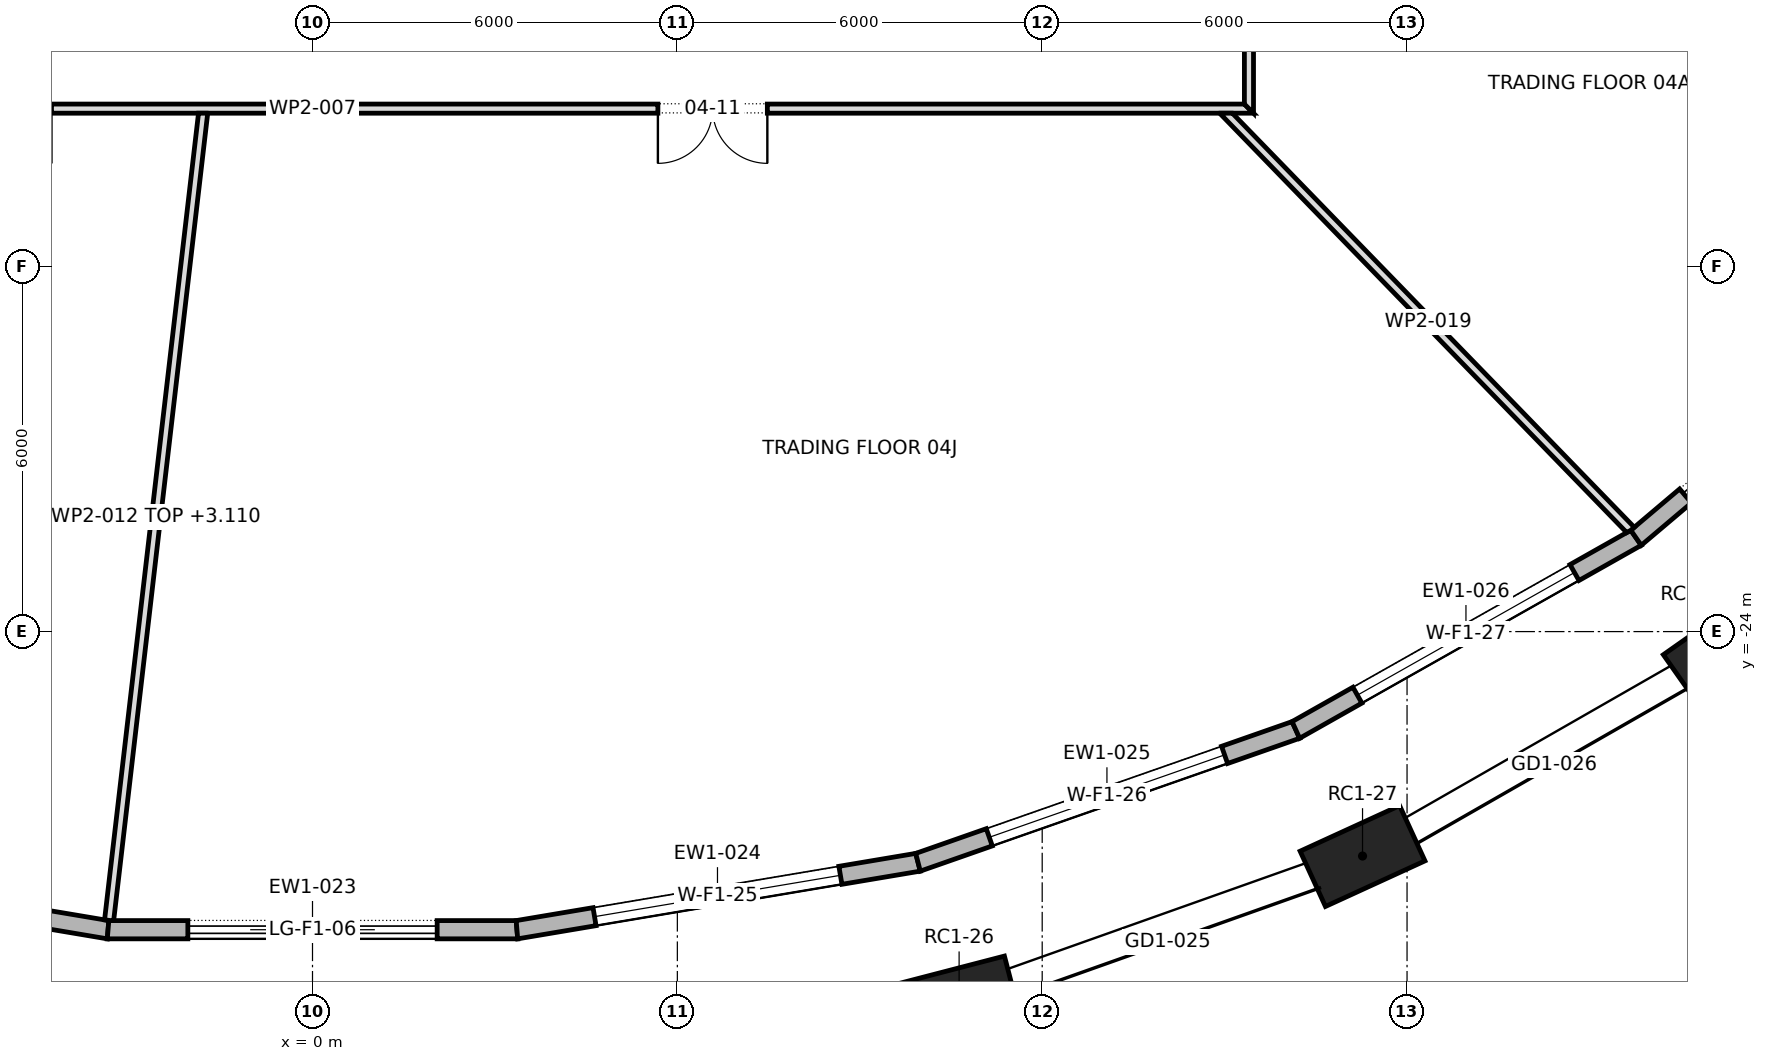
"""IFC4 building model, lengths in metres.
Left out: names, types, materials, properties, quantities, classifications, styles, units other than length and angle.
Written with IfcOpenShell. Run it as: python <this file> out.ifc"""

import sys

from ifc_helpers import new_model, si_unit, direction, frame, frame_2d, origin, origin_2d, place, context, subcontext, project, spatial, polyline, rectangle, outline, extrude, element, fill, save


model = new_model("IFC4")
c1 = context("Model", 3, precision=1e-05, world=origin(), true_north=direction((0.0, 1.0)))
c2 = subcontext(c1, "Body", "Model", "MODEL_VIEW")
j1 = project(units=[si_unit("LENGTHUNIT", "METRE"), si_unit("PLANEANGLEUNIT", "RADIAN")], contexts=[c1])
p1 = place(None, origin())
s1 = spatial("IfcSite", under=j1, at=p1, CompositionType="ELEMENT")
p2 = place(p1, origin())
s2 = spatial("IfcBuilding", under=s1, at=p2, CompositionType="ELEMENT")
p3 = place(p2, frame((0.0, 0.0, 69.7)))
s3 = spatial("IfcBuildingStorey", under=s2, at=p3, CompositionType="ELEMENT", Elevation=69.7)
for number, where, z_axis, x_axis in (
    (1, (10.634, -30.046, 0.0), (0.0, 0.0, 1.0), (0.968, 0.252, 0.0)),
    (2, (17.268, -27.691, 0.0), (0.0, 0.0, 1.0), (0.909, 0.417, 0.0)),
    (3, (23.239, -24.271, 0.0), (0.0, 0.0, 1.0), (0.818, 0.575, 0.0)),
):
    element("IfcColumn", number, at=place(p3, frame(where, z_axis=z_axis, x_axis=x_axis)), inside=s3, PredefinedType="COLUMN", context=c2, shape_type="SweptSolid", body=[
        extrude(rectangle(XDim=1.8, YDim=1.0, at=origin_2d()), origin(), (0.0, 0.0, 1.0), 4.2),
    ])
p4 = place(p3, frame((-9.958, -27.793, 0.0), z_axis=(0.0, 0.0, 1.0), x_axis=(0.986153133093, -0.165837263877, 0.0)))
e4 = element("IfcWall", 4, at=p4, inside=s3, PredefinedType="STANDARD", context=c2, shape_type="SweptSolid", body=[
    extrude(outline(polyline([(-0.013, -0.15), (6.7, -0.15), (6.676, 0.15), (0.013, 0.15), (-0.013, -0.15)])), origin(), (0.0, 0.0, 1.0), 3.9),
])
p5 = place(p4, frame((1.294, 0.0, 0.6)))
e5 = element("IfcOpeningElement", 5, at=p5, cuts=e4, PredefinedType="OPENING", context=c2, shape_type="SweptSolid", body=[
    extrude(rectangle(XDim=4.1, YDim=2.85, at=frame_2d((2.05, 1.425))), frame((0.0, 0.162, 0.0), z_axis=(0.0, -1.0, 0.0), x_axis=(1.0, 0.0, 0.0)), (0.0, 0.0, 1.0), 0.324),
])
p6 = place(p3, frame((-3.362, -28.903, 0.0), z_axis=(0.0, 0.0, 1.0), x_axis=(1.0, 0.0, 0.0)))
e6 = element("IfcWall", 6, at=p6, inside=s3, PredefinedType="STANDARD", context=c2, shape_type="SweptSolid", body=[
    extrude(outline(polyline([(-0.012, -0.15), (6.737, -0.15), (6.712, 0.15), (0.012, 0.15), (-0.012, -0.15)])), origin(), (0.0, 0.0, 1.0), 3.9),
])
p7 = place(p6, frame((1.312, 0.0, 0.0)))
e7 = element("IfcOpeningElement", 7, at=p7, cuts=e6, PredefinedType="OPENING", context=c2, shape_type="SweptSolid", body=[
    extrude(rectangle(XDim=4.1, YDim=3.45, at=frame_2d((2.05, 1.725))), frame((0.0, 0.162, 0.0), z_axis=(0.0, -1.0, 0.0), x_axis=(1.0, 0.0, 0.0)), (0.0, 0.0, 1.0), 0.324),
])
p8 = place(p3, frame((3.362, -28.903, 0.0), z_axis=(0.0, 0.0, 1.0), x_axis=(0.986153133093, 0.165837263877, 0.0)))
e8 = element("IfcWall", 8, at=p8, inside=s3, PredefinedType="STANDARD", context=c2, shape_type="SweptSolid", body=[
    extrude(outline(polyline([(-0.012, -0.15), (6.701, -0.15), (6.675, 0.15), (0.012, 0.15), (-0.012, -0.15)])), origin(), (0.0, 0.0, 1.0), 3.9),
])
p9 = place(p8, frame((1.294, 0.0, 0.6)))
e9 = element("IfcOpeningElement", 9, at=p9, cuts=e8, PredefinedType="OPENING", context=c2, shape_type="SweptSolid", body=[
    extrude(rectangle(XDim=4.1, YDim=2.85, at=frame_2d((2.05, 1.425))), frame((0.0, 0.162, 0.0), z_axis=(0.0, -1.0, 0.0), x_axis=(1.0, 0.0, 0.0)), (0.0, 0.0, 1.0), 0.324),
])
p10 = place(p3, frame((9.958, -27.793, 0.0), z_axis=(0.0, 0.0, 1.0), x_axis=(0.94380689486, 0.330497420889, 0.0)))
e10 = element("IfcWall", 10, at=p10, inside=s3, PredefinedType="STANDARD", context=c2, shape_type="SweptSolid", body=[
    extrude(outline(polyline([(-0.013, -0.15), (6.597, -0.15), (6.571, 0.15), (0.013, 0.15), (-0.013, -0.15)])), origin(), (0.0, 0.0, 1.0), 3.9),
])
p11 = place(p10, frame((1.242, 0.0, 0.6)))
e11 = element("IfcOpeningElement", 11, at=p11, cuts=e10, PredefinedType="OPENING", context=c2, shape_type="SweptSolid", body=[
    extrude(rectangle(XDim=4.1, YDim=2.85, at=frame_2d((2.05, 1.425))), frame((0.0, 0.162, 0.0), z_axis=(0.0, -1.0, 0.0), x_axis=(1.0, 0.0, 0.0)), (0.0, 0.0, 1.0), 0.324),
])
p12 = place(p3, frame((16.172, -25.617, 0.0), z_axis=(0.0, 0.0, 1.0), x_axis=(0.870673928577, 0.491860661262, 0.0)))
e12 = element("IfcWall", 12, at=p12, inside=s3, PredefinedType="STANDARD", context=c2, shape_type="SweptSolid", body=[
    extrude(outline(polyline([(-0.013, -0.15), (6.439, -0.15), (6.411, 0.15), (0.013, 0.15), (-0.013, -0.15)])), origin(), (0.0, 0.0, 1.0), 3.9),
])
p13 = place(p12, frame((1.163, 0.0, 0.6)))
e13 = element("IfcOpeningElement", 13, at=p13, cuts=e12, PredefinedType="OPENING", context=c2, shape_type="SweptSolid", body=[
    extrude(rectangle(XDim=4.1, YDim=2.85, at=frame_2d((2.05, 1.425))), frame((0.0, 0.162, 0.0), z_axis=(0.0, -1.0, 0.0), x_axis=(1.0, 0.0, 0.0)), (0.0, 0.0, 1.0), 0.324),
])
p14 = place(p3, frame((21.766, -22.457, 0.0), z_axis=(0.0, 0.0, 1.0), x_axis=(0.763655167989, 0.645624336905, 0.0)))
e14 = element("IfcWall", 14, at=p14, inside=s3, PredefinedType="STANDARD", context=c2, shape_type="SweptSolid", body=[
    extrude(outline(polyline([(-0.014, -0.15), (6.247, -0.15), (6.217, 0.15), (0.014, 0.15), (-0.014, -0.15)])), origin(), (0.0, 0.0, 1.0), 3.9),
])
p15 = place(p14, frame((1.066, 0.0, 0.0)))
e15 = element("IfcOpeningElement", 15, at=p15, cuts=e14, PredefinedType="OPENING", context=c2, shape_type="SweptSolid", body=[
    extrude(rectangle(XDim=4.1, YDim=3.45, at=frame_2d((2.05, 1.725))), frame((0.0, 0.162, 0.0), z_axis=(0.0, -1.0, 0.0), x_axis=(1.0, 0.0, 0.0)), (0.0, 0.0, 1.0), 0.324),
])
p16 = place(p3, frame((-15.475, -15.4, 0.0), z_axis=(0.0, 0.0, 1.0), x_axis=(1.0, 0.0, 0.0)))
e16 = element("IfcWall", 16, at=p16, inside=s3, PredefinedType="PARTITIONING", context=c2, shape_type="SweptSolid", body=[
    extrude(outline(polyline([(0.0, -0.075), (1.935, -0.075), (3.869, -0.075), (5.803, -0.075), (7.738, -0.075), (9.672, -0.075), (11.606, -0.075), (13.541, -0.075), (15.475, -0.075), (17.409, -0.075), (19.344, -0.075), (21.278, -0.075), (23.212, -0.075), (25.147, -0.075), (27.081, -0.075), (29.016, -0.075), (30.95, -0.075), (30.8, 0.075), (28.885, 0.075), (26.969, 0.075), (25.053, 0.075), (23.138, 0.075), (21.222, 0.075), (19.306, 0.075), (17.391, 0.075), (15.475, 0.075), (13.56, 0.075), (11.644, 0.075), (9.728, 0.075), (7.812, 0.075), (5.897, 0.075), (3.981, 0.075), (2.066, 0.075), (0.15, 0.075), (0.0, -0.075)])), origin(), (0.0, 0.0, 1.0), 3.9),
])
p17 = place(p16, frame((2.577, 0.0, 0.0)))
e17 = element("IfcOpeningElement", 17, at=p17, cuts=e16, PredefinedType="OPENING", context=c2, shape_type="SweptSolid", body=[
    extrude(rectangle(XDim=1.8, YDim=2.1, at=frame_2d((0.9, 1.05))), frame((0.0, 0.087, 0.0), z_axis=(0.0, -1.0, 0.0), x_axis=(1.0, 0.0, 0.0)), (0.0, 0.0, 1.0), 0.174),
])
p18 = place(p16, frame((9.383, 0.0, 0.0)))
e18 = element("IfcOpeningElement", 18, at=p18, cuts=e16, PredefinedType="OPENING", context=c2, shape_type="SweptSolid", body=[
    extrude(rectangle(XDim=1.8, YDim=2.1, at=frame_2d((0.9, 1.05))), frame((0.0, 0.087, 0.0), z_axis=(0.0, -1.0, 0.0), x_axis=(1.0, 0.0, 0.0)), (0.0, 0.0, 1.0), 0.174),
])
p19 = place(p16, frame((21.155, 0.0, 0.0)))
e19 = element("IfcOpeningElement", 19, at=p19, cuts=e16, PredefinedType="OPENING", context=c2, shape_type="SweptSolid", body=[
    extrude(rectangle(XDim=1.8, YDim=2.1, at=frame_2d((0.9, 1.05))), frame((0.0, 0.087, 0.0), z_axis=(0.0, -1.0, 0.0), x_axis=(1.0, 0.0, 0.0)), (0.0, 0.0, 1.0), 0.174),
])
p20 = place(p3, frame((-1.798, -15.467, 0.0), z_axis=(0.0, 0.0, 1.0), x_axis=(-0.115696073872, -0.993284661359, 0.0)))
e20 = element("IfcWall", 20, at=p20, inside=s3, PredefinedType="PARTITIONING", context=c2, shape_type="SweptSolid", body=[
    extrude(outline(polyline([(13.372, -0.075), (13.372, 0.031), (13.367, 0.075), (11.458, 0.075), (9.548, 0.075), (7.638, 0.075), (5.729, 0.075), (3.819, 0.075), (1.91, 0.075), (0.0, 0.075), (0.0, 0.073), (0.017, -0.075), (1.925, -0.075), (3.833, -0.075), (5.741, -0.075), (7.649, -0.075), (9.557, -0.075), (11.464, -0.075), (13.372, -0.075)])), origin(), (0.0, 0.0, 1.0), 3.11),
])
p21 = place(p3, frame((15.4, -15.475, 0.0), z_axis=(0.0, 0.0, 1.0), x_axis=(0.0, 1.0, 0.0)))
e21 = element("IfcWall", 21, at=p21, inside=s3, PredefinedType="PARTITIONING", context=c2, shape_type="SweptSolid", body=[
    extrude(outline(polyline([(0.0, -0.075), (1.935, -0.075), (3.869, -0.075), (5.803, -0.075), (7.738, -0.075), (9.672, -0.075), (11.606, -0.075), (13.541, -0.075), (15.475, -0.075), (17.409, -0.075), (19.344, -0.075), (21.278, -0.075), (23.212, -0.075), (25.147, -0.075), (27.081, -0.075), (29.016, -0.075), (30.95, -0.075), (30.8, 0.075), (28.885, 0.075), (26.969, 0.075), (25.053, 0.075), (23.138, 0.075), (21.222, 0.075), (19.306, 0.075), (17.391, 0.075), (15.475, 0.075), (13.56, 0.075), (11.644, 0.075), (9.728, 0.075), (7.812, 0.075), (5.897, 0.075), (3.981, 0.075), (2.066, 0.075), (0.15, 0.075), (0.0, -0.075)])), origin(), (0.0, 0.0, 1.0), 3.9),
])
p22 = place(p21, frame((4.9, 0.0, 0.0)))
e22 = element("IfcOpeningElement", 22, at=p22, cuts=e21, PredefinedType="OPENING", context=c2, shape_type="SweptSolid", body=[
    extrude(rectangle(XDim=1.8, YDim=2.1, at=frame_2d((0.9, 1.05))), frame((0.0, 0.087, 0.0), z_axis=(0.0, -1.0, 0.0), x_axis=(1.0, 0.0, 0.0)), (0.0, 0.0, 1.0), 0.174),
])
p23 = place(p21, frame((14.975, 0.0, 0.0)))
e23 = element("IfcOpeningElement", 23, at=p23, cuts=e21, PredefinedType="OPENING", context=c2, shape_type="SweptSolid", body=[
    extrude(rectangle(XDim=1.0, YDim=2.1, at=frame_2d((0.5, 1.05))), frame((0.0, 0.087, 0.0), z_axis=(0.0, -1.0, 0.0), x_axis=(1.0, 0.0, 0.0)), (0.0, 0.0, 1.0), 0.174),
])
p24 = place(p21, frame((24.25, 0.0, 0.0)))
e24 = element("IfcOpeningElement", 24, at=p24, cuts=e21, PredefinedType="OPENING", context=c2, shape_type="SweptSolid", body=[
    extrude(rectangle(XDim=1.8, YDim=2.1, at=frame_2d((0.9, 1.05))), frame((0.0, 0.087, 0.0), z_axis=(0.0, -1.0, 0.0), x_axis=(1.0, 0.0, 0.0)), (0.0, 0.0, 1.0), 0.174),
])
p25 = place(p3, frame((21.683, -22.337, 0.0), z_axis=(0.0, 0.0, 1.0), x_axis=(-0.696500320059, 0.71755648151, 0.0)))
e25 = element("IfcWall", 25, at=p25, inside=s3, PredefinedType="PARTITIONING", context=c2, shape_type="SweptSolid", body=[
    extrude(outline(polyline([(0.0, -0.075), (1.898, -0.075), (3.796, -0.075), (5.694, -0.075), (7.592, -0.075), (9.49, -0.075), (9.635, 0.074), (9.635, 0.075), (7.713, 0.075), (5.791, 0.075), (3.869, 0.075), (1.947, 0.075), (0.024, 0.075), (0.005, 0.0), (0.0, -0.072), (0.0, -0.075)])), origin(), (0.0, 0.0, 1.0), 3.9),
])
p26 = place(p7, origin())
e26 = element("IfcDoor", 26, at=p26, inside=s3, OperationType="DOUBLE_DOOR_SLIDING", PredefinedType="DOOR", context=c2, shape_type="SweptSolid", body=[
    extrude(rectangle(XDim=4.1, YDim=3.45, at=frame_2d((2.05, 1.725))), frame((0.0, 0.025, 0.0), z_axis=(0.0, -1.0, 0.0), x_axis=(1.0, 0.0, 0.0)), (0.0, 0.0, 1.0), 0.05),
])
fill(e7, e26)
p27 = place(p9, origin())
e27 = element("IfcWindow", 27, at=p27, inside=s3, PartitioningType="TRIPLE_PANEL_VERTICAL", PredefinedType="WINDOW", context=c2, shape_type="SweptSolid", body=[
    extrude(rectangle(XDim=4.1, YDim=2.85, at=frame_2d((2.05, 1.425))), frame((0.0, 0.03, 0.0), z_axis=(0.0, -1.0, 0.0), x_axis=(1.0, 0.0, 0.0)), (0.0, 0.0, 1.0), 0.06),
])
fill(e9, e27)
p28 = place(p11, origin())
e28 = element("IfcWindow", 28, at=p28, inside=s3, PartitioningType="TRIPLE_PANEL_VERTICAL", PredefinedType="WINDOW", context=c2, shape_type="SweptSolid", body=[
    extrude(rectangle(XDim=4.1, YDim=2.85, at=frame_2d((2.05, 1.425))), frame((0.0, 0.03, 0.0), z_axis=(0.0, -1.0, 0.0), x_axis=(1.0, 0.0, 0.0)), (0.0, 0.0, 1.0), 0.06),
])
fill(e11, e28)
p29 = place(p13, origin())
e29 = element("IfcWindow", 29, at=p29, inside=s3, PartitioningType="TRIPLE_PANEL_VERTICAL", PredefinedType="WINDOW", context=c2, shape_type="SweptSolid", body=[
    extrude(rectangle(XDim=4.1, YDim=2.85, at=frame_2d((2.05, 1.425))), frame((0.0, 0.03, 0.0), z_axis=(0.0, -1.0, 0.0), x_axis=(1.0, 0.0, 0.0)), (0.0, 0.0, 1.0), 0.06),
])
fill(e13, e29)
p30 = place(p15, origin())
e30 = element("IfcDoor", 30, at=p30, inside=s3, OperationType="DOUBLE_DOOR_SLIDING", PredefinedType="DOOR", context=c2, shape_type="SweptSolid", body=[
    extrude(rectangle(XDim=4.1, YDim=3.45, at=frame_2d((2.05, 1.725))), frame((0.0, 0.025, 0.0), z_axis=(0.0, -1.0, 0.0), x_axis=(1.0, 0.0, 0.0)), (0.0, 0.0, 1.0), 0.05),
])
fill(e15, e30)
p31 = place(p19, frame((1.8, 0.0, 0.0), z_axis=(0.0, 0.0, 1.0), x_axis=(-1.0, 0.0, 0.0)))
e31 = element("IfcDoor", 31, at=p31, inside=s3, OperationType="DOUBLE_DOOR_SINGLE_SWING", PredefinedType="DOOR", context=c2, shape_type="SweptSolid", body=[
    extrude(rectangle(XDim=1.8, YDim=2.1, at=frame_2d((0.9, 1.05))), frame((0.0, 0.025, 0.0), z_axis=(0.0, -1.0, 0.0), x_axis=(1.0, 0.0, 0.0)), (0.0, 0.0, 1.0), 0.05),
])
fill(e19, e31)
save(model, sys.argv[1])
